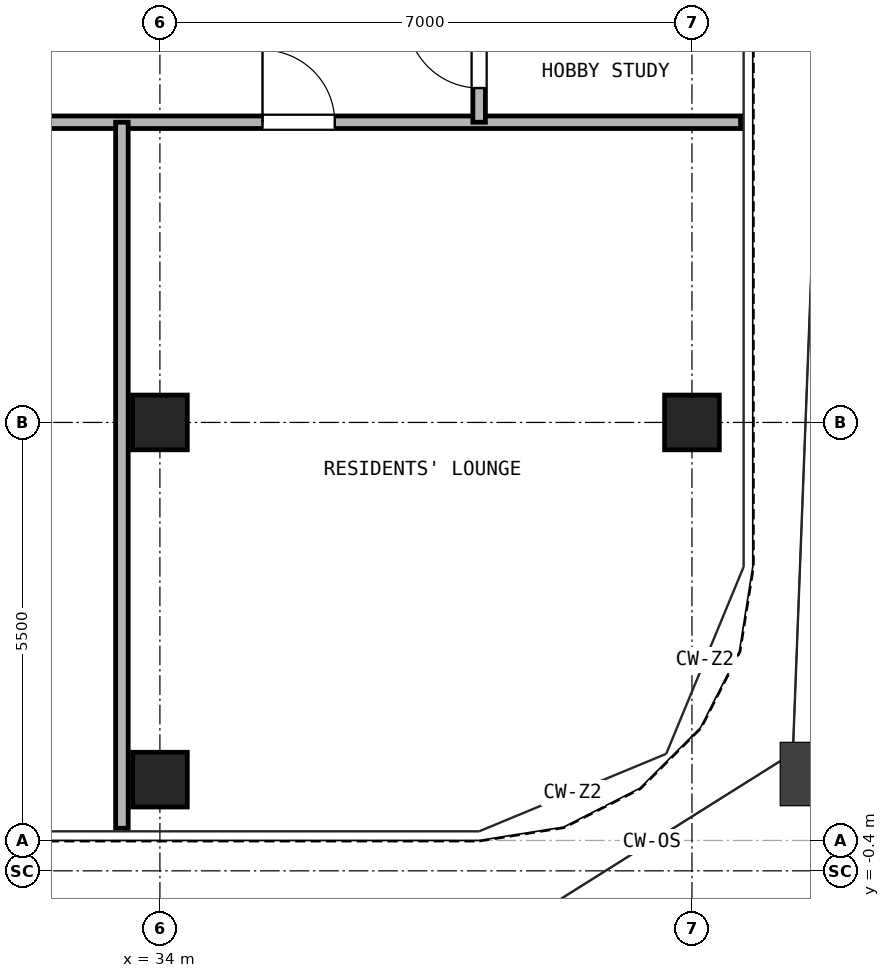
"""IFC4 building model, lengths in metres.
Left out: names, types, materials, properties, quantities, classifications, styles, units other than length and angle.
Written with IfcOpenShell. Run it as: python <this file> out.ifc"""

import sys

from ifc_helpers import new_model, si_unit, direction, frame, frame_2d, origin, origin_2d, place, context, subcontext, project, spatial, rectangle, hollow_rectangle, extrude, source, transform, mapped, element, fill, save


model = new_model("IFC4")
c1 = context("Model", 3, precision=1e-05, world=origin(), true_north=direction((0.0, 1.0)))
c2 = subcontext(c1, "Body", "Model", "MODEL_VIEW")
j1 = project(units=[si_unit("LENGTHUNIT", "METRE"), si_unit("PLANEANGLEUNIT", "RADIAN")], contexts=[c1])
p1 = place(None, origin())
s1 = spatial("IfcSite", under=j1, at=p1, CompositionType="ELEMENT")
p2 = place(p1, origin())
s2 = spatial("IfcBuilding", under=s1, at=p2, CompositionType="ELEMENT")
p3 = place(p2, frame((0.0, 0.0, 172.1)))
s3 = spatial("IfcBuildingStorey", under=s2, at=p3, CompositionType="ELEMENT", Elevation=172.1)
m1 = source(origin(), c2, "Body", "SweptSolid", [
    extrude(hollow_rectangle(XDim=0.72, YDim=0.72, WallThickness=0.04, at=origin_2d()), origin(), (0.0, 0.0, 1.0), 2.95),
])
for number, where, z_axis, x_axis in (
    (1, (34.0, 0.8, 0.0), (0.0, 0.0, 1.0), (1.0, 0.0, 0.0)),
    (2, (41.0, 5.5, 0.0), (0.0, 0.0, 1.0), (1.0, 0.0, 0.0)),
    (3, (34.0, 5.5, 0.0), (0.0, 0.0, 1.0), (1.0, 0.0, 0.0)),
):
    element("IfcColumn", number, at=place(p3, frame(where, z_axis=z_axis, x_axis=x_axis)), inside=s3, PredefinedType="COLUMN", context=c2, shape_type="MappedRepresentation", body=[
        mapped(m1, transform((0.0, 0.0, 0.0), x_axis=(1.0, 0.0, 0.0), y_axis=(0.0, 1.0, 0.0), z_axis=(0.0, 0.0, 1.0), scale=1.0)),
    ])
p4 = place(p3, frame((0.16, 9.45, 0.0), z_axis=(0.0, 0.0, 1.0), x_axis=(1.0, 0.0, 0.0)))
e4 = element("IfcWall", 4, at=p4, inside=s3, PredefinedType="PARTITIONING", context=c2, shape_type="SweptSolid", body=[
    extrude(rectangle(XDim=41.48, YDim=0.165, at=frame_2d((20.74, 0.0))), origin(), (0.0, 0.0, 1.0), 2.95),
])
p5 = place(p4, frame((12.89, 0.0, 0.0)))
e5 = element("IfcOpeningElement", 5, at=p5, cuts=e4, PredefinedType="OPENING", context=c2, shape_type="SweptSolid", body=[
    extrude(rectangle(XDim=0.95, YDim=2.15, at=frame_2d((0.475, 1.075))), frame((0.0, 0.093, 0.0), z_axis=(0.0, -1.0, 0.0), x_axis=(1.0, 0.0, 0.0)), (0.0, 0.0, 1.0), 0.185),
])
p6 = place(p4, frame((23.34, 0.0, 0.0)))
e6 = element("IfcOpeningElement", 6, at=p6, cuts=e4, PredefinedType="OPENING", context=c2, shape_type="SweptSolid", body=[
    extrude(rectangle(XDim=0.95, YDim=2.15, at=frame_2d((0.475, 1.075))), frame((0.0, 0.093, 0.0), z_axis=(0.0, -1.0, 0.0), x_axis=(1.0, 0.0, 0.0)), (0.0, 0.0, 1.0), 0.185),
])
p7 = place(p4, frame((30.34, 0.0, 0.0)))
e7 = element("IfcOpeningElement", 7, at=p7, cuts=e4, PredefinedType="OPENING", context=c2, shape_type="SweptSolid", body=[
    extrude(rectangle(XDim=0.95, YDim=2.15, at=frame_2d((0.475, 1.075))), frame((0.0, 0.093, 0.0), z_axis=(0.0, -1.0, 0.0), x_axis=(1.0, 0.0, 0.0)), (0.0, 0.0, 1.0), 0.185),
])
p8 = place(p4, frame((35.19, 0.0, 0.0)))
e8 = element("IfcOpeningElement", 8, at=p8, cuts=e4, PredefinedType="OPENING", context=c2, shape_type="SweptSolid", body=[
    extrude(rectangle(XDim=0.95, YDim=2.15, at=frame_2d((0.475, 1.075))), frame((0.0, 0.093, 0.0), z_axis=(0.0, -1.0, 0.0), x_axis=(1.0, 0.0, 0.0)), (0.0, 0.0, 1.0), 0.185),
])
p9 = place(p3, frame((38.2, 9.45, 0.0), z_axis=(0.0, 0.0, 1.0), x_axis=(0.0, 1.0, 0.0)))
e9 = element("IfcWall", 9, at=p9, inside=s3, PredefinedType="PARTITIONING", context=c2, shape_type="SweptSolid", body=[
    extrude(rectangle(XDim=2.0, YDim=0.165, at=frame_2d((1.0, 0.0))), origin(), (0.0, 0.0, 1.0), 2.95),
])
p10 = place(p9, frame((0.45, 0.0, 0.0)))
e10 = element("IfcOpeningElement", 10, at=p10, cuts=e9, PredefinedType="OPENING", context=c2, shape_type="SweptSolid", body=[
    extrude(rectangle(XDim=0.95, YDim=2.15, at=frame_2d((0.475, 1.075))), frame((0.0, 0.093, 0.0), z_axis=(0.0, -1.0, 0.0), x_axis=(1.0, 0.0, 0.0)), (0.0, 0.0, 1.0), 0.185),
])
p11 = place(p3, frame((33.5, 0.16, 0.0), z_axis=(0.0, 0.0, 1.0), x_axis=(0.0, 1.0, 0.0)))
e11 = element("IfcWall", 11, at=p11, inside=s3, PredefinedType="PARTITIONING", context=c2, shape_type="SweptSolid", body=[
    extrude(rectangle(XDim=9.29, YDim=0.165, at=frame_2d((4.645, 0.0))), origin(), (0.0, 0.0, 1.0), 2.95),
])
p12 = place(p8, frame((0.95, 0.0, 0.0), z_axis=(0.0, 0.0, 1.0), x_axis=(-1.0, 0.0, 0.0)))
e12 = element("IfcDoor", 12, at=p12, inside=s3, OperationType="SINGLE_SWING_LEFT", PredefinedType="DOOR", context=c2, shape_type="SweptSolid", body=[
    extrude(rectangle(XDim=0.95, YDim=2.15, at=frame_2d((0.475, 1.075))), frame((0.0, 0.025, 0.0), z_axis=(0.0, -1.0, 0.0), x_axis=(1.0, 0.0, 0.0)), (0.0, 0.0, 1.0), 0.05),
])
fill(e8, e12)
p13 = place(p10, origin())
e13 = element("IfcDoor", 13, at=p13, inside=s3, OperationType="SINGLE_SWING_RIGHT", PredefinedType="DOOR", context=c2, shape_type="SweptSolid", body=[
    extrude(rectangle(XDim=0.95, YDim=2.15, at=frame_2d((0.475, 1.075))), frame((0.0, 0.025, 0.0), z_axis=(0.0, -1.0, 0.0), x_axis=(1.0, 0.0, 0.0)), (0.0, 0.0, 1.0), 0.05),
])
fill(e10, e13)
save(model, sys.argv[1])
